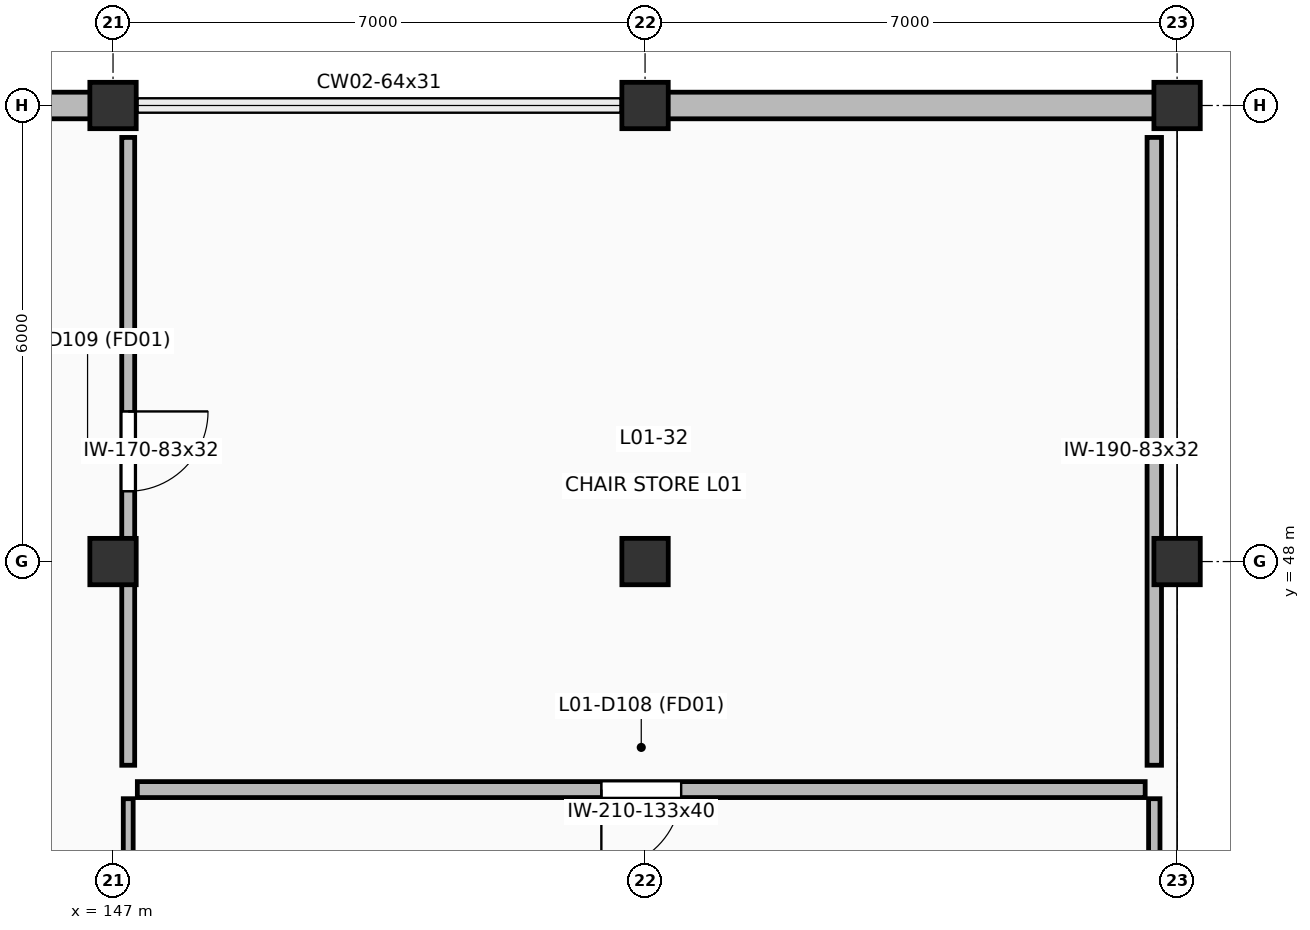
"""IFC4 building model, lengths in metres.
Left out: names, types, materials, properties, quantities, classifications, styles, units other than length and angle.
Written with IfcOpenShell. Run it as: python <this file> out.ifc"""

import sys

from ifc_helpers import new_model, si_unit, direction, frame, frame_2d, origin, origin_2d, place, context, subcontext, project, spatial, rectangle, extrude, element, fill, save


model = new_model("IFC4")
c1 = context("Model", 3, precision=1e-05, world=origin(), true_north=direction((0.0, 1.0)))
c2 = subcontext(c1, "Body", "Model", "MODEL_VIEW")
j1 = project(units=[si_unit("LENGTHUNIT", "METRE"), si_unit("PLANEANGLEUNIT", "RADIAN")], contexts=[c1])
p1 = place(None, origin())
s1 = spatial("IfcSite", under=j1, at=p1, CompositionType="ELEMENT")
p2 = place(p1, origin())
s2 = spatial("IfcBuilding", under=s1, at=p2, CompositionType="ELEMENT")
p3 = place(p2, frame((0.0, 0.0, 5.4)))
s3 = spatial("IfcBuildingStorey", under=s2, at=p3, CompositionType="ELEMENT", Elevation=5.4)
for number, where, z_axis, x_axis in (
    (1, (147.0, 48.0, 0.0), (0.0, 0.0, 1.0), (1.0, 0.0, 0.0)),
    (2, (147.0, 54.0, 0.0), (0.0, 0.0, 1.0), (1.0, 0.0, 0.0)),
    (3, (154.0, 48.0, 0.0), (0.0, 0.0, 1.0), (1.0, 0.0, 0.0)),
    (4, (154.0, 54.0, 0.0), (0.0, 0.0, 1.0), (1.0, 0.0, 0.0)),
    (5, (161.0, 48.0, 0.0), (0.0, 0.0, 1.0), (1.0, 0.0, 0.0)),
    (6, (161.0, 54.0, 0.0), (0.0, 0.0, 1.0), (1.0, 0.0, 0.0)),
):
    element("IfcColumn", number, at=place(p3, frame(where, z_axis=z_axis, x_axis=x_axis)), inside=s3, PredefinedType="COLUMN", context=c2, shape_type="SweptSolid", body=[
        extrude(rectangle(XDim=0.61, YDim=0.61, at=origin_2d()), origin(), (0.0, 0.0, 1.0), 4.2),
    ])
for number, where, z_axis, x_axis in (
    (7, (140.0, 54.0, 0.0), (0.0, 0.0, 1.0), (1.0, 0.0, 0.0)),
    (8, (154.0, 54.0, 0.0), (0.0, 0.0, 1.0), (1.0, 0.0, 0.0)),
):
    element("IfcWall", number, at=place(p3, frame(where, z_axis=z_axis, x_axis=x_axis)), inside=s3, PredefinedType="SOLIDWALL", context=c2, shape_type="SweptSolid", body=[
        extrude(rectangle(XDim=7.0, YDim=0.35, at=frame_2d((3.5, 0.0))), origin(), (0.0, 0.0, 1.0), 3.135),
    ])
p4 = place(p3, frame((160.58, 45.0, 0.0), z_axis=(0.0, 0.0, 1.0), x_axis=(-1.0, 0.0, 0.0)))
e9 = element("IfcWall", 9, at=p4, inside=s3, PredefinedType="PARTITIONING", context=c2, shape_type="SweptSolid", body=[
    extrude(rectangle(XDim=13.26, YDim=0.21, at=frame_2d((6.63, 0.0))), origin(), (0.0, 0.0, 1.0), 3.98),
])
p5 = place(p4, frame((6.105, 0.0, 0.0)))
e10 = element("IfcOpeningElement", 10, at=p5, cuts=e9, PredefinedType="OPENING", context=c2, shape_type="SweptSolid", body=[
    extrude(rectangle(XDim=1.05, YDim=2.2, at=frame_2d((0.525, 1.1))), frame((0.0, 0.115, 0.0), z_axis=(0.0, -1.0, 0.0), x_axis=(1.0, 0.0, 0.0)), (0.0, 0.0, 1.0), 0.23),
])
p6 = place(p3, frame((147.2, 44.88, 0.0), z_axis=(0.0, 0.0, 1.0), x_axis=(0.0, -1.0, 0.0)))
e11 = element("IfcWall", 11, at=p6, inside=s3, PredefinedType="PARTITIONING", context=c2, shape_type="SweptSolid", body=[
    extrude(rectangle(XDim=8.76, YDim=0.13, at=frame_2d((4.38, 0.0))), origin(), (0.0, 0.0, 1.0), 3.245),
])
p7 = place(p3, frame((160.7, 36.12, 0.0), z_axis=(0.0, 0.0, 1.0), x_axis=(0.0, 1.0, 0.0)))
e12 = element("IfcWall", 12, at=p7, inside=s3, PredefinedType="PARTITIONING", context=c2, shape_type="SweptSolid", body=[
    extrude(rectangle(XDim=8.76, YDim=0.15, at=frame_2d((4.38, 0.0))), origin(), (0.0, 0.0, 1.0), 3.245),
])
p8 = place(p3, frame((147.2, 53.58, 0.0), z_axis=(0.0, 0.0, 1.0), x_axis=(0.0, -1.0, 0.0)))
e13 = element("IfcWall", 13, at=p8, inside=s3, PredefinedType="PARTITIONING", context=c2, shape_type="SweptSolid", body=[
    extrude(rectangle(XDim=8.26, YDim=0.17, at=frame_2d((4.13, 0.0))), origin(), (0.0, 0.0, 1.0), 3.245),
])
p9 = place(p8, frame((3.605, 0.0, 0.0)))
e14 = element("IfcOpeningElement", 14, at=p9, cuts=e13, PredefinedType="OPENING", context=c2, shape_type="SweptSolid", body=[
    extrude(rectangle(XDim=1.05, YDim=2.2, at=frame_2d((0.525, 1.1))), frame((0.0, 0.095, 0.0), z_axis=(0.0, -1.0, 0.0), x_axis=(1.0, 0.0, 0.0)), (0.0, 0.0, 1.0), 0.19),
])
p10 = place(p3, frame((160.7, 45.32, 0.0), z_axis=(0.0, 0.0, 1.0), x_axis=(0.0, 1.0, 0.0)))
e15 = element("IfcWall", 15, at=p10, inside=s3, PredefinedType="PARTITIONING", context=c2, shape_type="SweptSolid", body=[
    extrude(rectangle(XDim=8.26, YDim=0.19, at=frame_2d((4.13, 0.0))), origin(), (0.0, 0.0, 1.0), 3.245),
])
p11 = place(p5, origin())
e16 = element("IfcDoor", 16, at=p11, inside=s3, OperationType="SINGLE_SWING_RIGHT", PredefinedType="DOOR", context=c2, shape_type="SweptSolid", body=[
    extrude(rectangle(XDim=1.05, YDim=2.2, at=frame_2d((0.525, 1.1))), frame((0.0, 0.025, 0.0), z_axis=(0.0, -1.0, 0.0), x_axis=(1.0, 0.0, 0.0)), (0.0, 0.0, 1.0), 0.05),
])
fill(e10, e16)
p12 = place(p9, origin())
e17 = element("IfcDoor", 17, at=p12, inside=s3, OperationType="SINGLE_SWING_LEFT", PredefinedType="DOOR", context=c2, shape_type="SweptSolid", body=[
    extrude(rectangle(XDim=1.05, YDim=2.2, at=frame_2d((0.525, 1.1))), frame((0.0, 0.025, 0.0), z_axis=(0.0, -1.0, 0.0), x_axis=(1.0, 0.0, 0.0)), (0.0, 0.0, 1.0), 0.05),
])
fill(e14, e17)
save(model, sys.argv[1])
